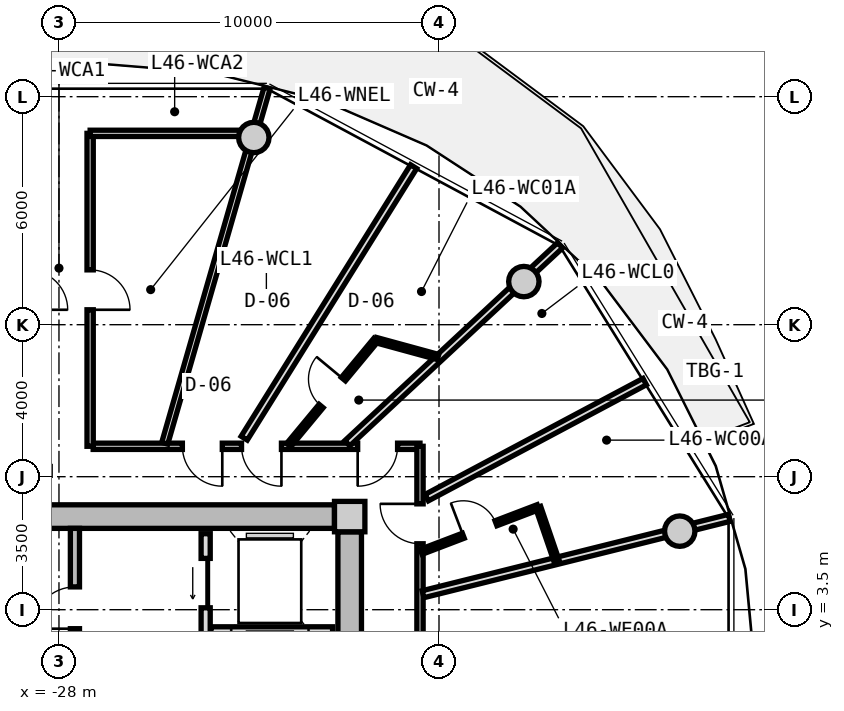
"""IFC4 building model, lengths in metres.
Left out: names, types, materials, properties, quantities, classifications, styles, units other than length and angle.
Written with IfcOpenShell. Run it as: python <this file> out.ifc"""

import sys

from ifc_helpers import new_model, si_unit, direction, frame, frame_2d, origin, origin_2d, place, context, subcontext, project, spatial, rectangle, circle, extrude, source, transform, mapped, element, fill, save


model = new_model("IFC4")
c1 = context("Model", 3, precision=1e-05, world=origin(), true_north=direction((0.0, 1.0)))
c2 = subcontext(c1, "Body", "Model", "MODEL_VIEW")
j1 = project(units=[si_unit("LENGTHUNIT", "METRE"), si_unit("PLANEANGLEUNIT", "RADIAN")], contexts=[c1])
p1 = place(None, origin())
s1 = spatial("IfcSite", under=j1, at=p1, CompositionType="ELEMENT")
p2 = place(p1, origin())
s2 = spatial("IfcBuilding", under=s1, at=p2, CompositionType="ELEMENT")
p3 = place(p2, frame((0.0, 0.0, 149.55)))
s3 = spatial("IfcBuildingStorey", under=s2, at=p3, CompositionType="ELEMENT", Elevation=149.55)
m1 = source(origin(), c2, "Body", "SweptSolid", [
    extrude(rectangle(XDim=0.8, YDim=0.8, at=origin_2d()), origin(), (0.0, 0.0, 1.0), 3.05),
])
p4 = place(p3, frame((-20.35, 5.95, 0.0), z_axis=(0.0, 0.0, 1.0), x_axis=(1.0, 0.0, 0.0)))
e1 = element("IfcColumn", 1, at=p4, inside=s3, PredefinedType="COLUMN", context=c2, shape_type="MappedRepresentation", body=[
    mapped(m1, transform((0.0, 0.0, 0.0), x_axis=(1.0, 0.0, 0.0), y_axis=(0.0, 1.0, 0.0), z_axis=(0.0, 0.0, 1.0), scale=1.0)),
])
m2 = source(origin(), c2, "Body", "SweptSolid", [
    extrude(rectangle(XDim=14.5, YDim=0.62, at=frame_2d((7.25, 0.0))), origin(), (0.0, 0.0, 1.0), 2.81),
])
p5 = place(p3, frame((-35.25, 5.95, 0.0), z_axis=(0.0, 0.0, 1.0), x_axis=(1.0, 0.0, 0.0)))
e2 = element("IfcWall", 2, at=p5, inside=s3, PredefinedType="SHEAR", context=c2, shape_type="MappedRepresentation", body=[
    mapped(m2, transform((0.0, 0.0, 0.0), x_axis=(1.0, 0.0, 0.0), y_axis=(0.0, 1.0, 0.0), z_axis=(0.0, 0.0, 1.0), scale=1.0)),
])
m3 = source(origin(), c2, "Body", "SweptSolid", [
    extrude(rectangle(XDim=11.1, YDim=0.62, at=frame_2d((5.55, 0.0))), origin(), (0.0, 0.0, 1.0), 2.81),
])
p6 = place(p3, frame((-20.35, 5.55, 0.0), z_axis=(0.0, 0.0, 1.0), x_axis=(0.0, -1.0, 0.0)))
e3 = element("IfcWall", 3, at=p6, inside=s3, PredefinedType="SHEAR", context=c2, shape_type="MappedRepresentation", body=[
    mapped(m3, transform((0.0, 0.0, 0.0), x_axis=(1.0, 0.0, 0.0), y_axis=(0.0, 1.0, 0.0), z_axis=(0.0, 0.0, 1.0), scale=1.0)),
])
p7 = place(p6, frame((5.65, 0.0, 0.0)))
e4 = element("IfcOpeningElement", 4, at=p7, cuts=e3, PredefinedType="OPENING", context=c2, shape_type="SweptSolid", body=[
    extrude(rectangle(XDim=1.2, YDim=2.15, at=frame_2d((0.6, 1.075))), frame((0.0, 0.32, 0.0), z_axis=(0.0, -1.0, 0.0), x_axis=(1.0, 0.0, 0.0)), (0.0, 0.0, 1.0), 0.64),
])
p8 = place(p6, frame((9.3, 0.0, 0.0)))
e5 = element("IfcOpeningElement", 5, at=p8, cuts=e3, PredefinedType="OPENING", context=c2, shape_type="SweptSolid", body=[
    extrude(rectangle(XDim=1.0, YDim=2.1, at=frame_2d((0.5, 1.05))), frame((0.0, 0.32, 0.0), z_axis=(0.0, -1.0, 0.0), x_axis=(1.0, 0.0, 0.0)), (0.0, 0.0, 1.0), 0.64),
])
m4 = source(origin(), c2, "Body", "SweptSolid", [
    extrude(circle(Radius=0.4, at=origin_2d()), origin(), (0.0, 0.0, 1.0), 3.05),
])
for number, where, z_axis, x_axis in (
    (6, (-11.665, 5.567, 0.0), (0.0, 0.0, 1.0), (1.0, 0.0, 0.0)),
    (7, (-15.767, 12.135, 0.0), (0.0, 0.0, 1.0), (1.0, 0.0, 0.0)),
    (8, (-22.873, 15.926, 0.0), (0.0, 0.0, 1.0), (1.0, 0.0, 0.0)),
):
    element("IfcColumn", number, at=place(p3, frame(where, z_axis=z_axis, x_axis=x_axis)), inside=s3, PredefinedType="COLUMN", context=c2, shape_type="MappedRepresentation", body=[
        mapped(m4, transform((0.0, 0.0, 0.0), x_axis=(1.0, 0.0, 0.0), y_axis=(0.0, 1.0, 0.0), z_axis=(0.0, 0.0, 1.0), scale=1.0)),
    ])
m5 = source(origin(), c2, "Body", "SweptSolid", [
    extrude(rectangle(XDim=3.19, YDim=0.24, at=frame_2d((1.595, 0.0))), origin(), (0.0, 0.0, 1.0), 2.81),
])
p9 = place(p3, frame((-27.58, 2.45, 0.0), z_axis=(0.0, 0.0, 1.0), x_axis=(0.0, 1.0, 0.0)))
e9 = element("IfcWall", 9, at=p9, inside=s3, PredefinedType="PARTITIONING", context=c2, shape_type="MappedRepresentation", body=[
    mapped(m5, transform((0.0, 0.0, 0.0), x_axis=(1.0, 0.0, 0.0), y_axis=(0.0, 1.0, 0.0), z_axis=(0.0, 0.0, 1.0), scale=1.0)),
])
p10 = place(p9, frame((0.55, 0.0, 0.0)))
e10 = element("IfcOpeningElement", 10, at=p10, cuts=e9, PredefinedType="OPENING", context=c2, shape_type="SweptSolid", body=[
    extrude(rectangle(XDim=1.1, YDim=2.15, at=frame_2d((0.55, 1.075))), frame((0.0, 0.13, 0.0), z_axis=(0.0, -1.0, 0.0), x_axis=(1.0, 0.0, 0.0)), (0.0, 0.0, 1.0), 0.26),
])
m6 = source(origin(), c2, "Body", "SweptSolid", [
    extrude(rectangle(XDim=5.0, YDim=0.24, at=frame_2d((2.5, 0.0))), origin(), (0.0, 0.0, 1.0), 2.795),
])
p11 = place(p3, frame((-24.14, 0.5, 0.0), z_axis=(0.0, 0.0, 1.0), x_axis=(0.0, 1.0, 0.0)))
e11 = element("IfcWall", 11, at=p11, inside=s3, PredefinedType="PARTITIONING", context=c2, shape_type="MappedRepresentation", body=[
    mapped(m6, transform((0.0, 0.0, 0.0), x_axis=(1.0, 0.0, 0.0), y_axis=(0.0, 1.0, 0.0), z_axis=(0.0, 0.0, 1.0), scale=1.0)),
])
p12 = place(p11, frame((3.05, 0.0, 0.0)))
e12 = element("IfcOpeningElement", 12, at=p12, cuts=e11, PredefinedType="OPENING", context=c2, shape_type="SweptSolid", body=[
    extrude(rectangle(XDim=1.3, YDim=2.2, at=frame_2d((0.65, 1.1))), frame((0.0, 0.13, 0.0), z_axis=(0.0, -1.0, 0.0), x_axis=(1.0, 0.0, 0.0)), (0.0, 0.0, 1.0), 0.26),
])
p13 = place(p11, frame((0.55, 0.0, 0.0)))
e13 = element("IfcOpeningElement", 13, at=p13, cuts=e11, PredefinedType="OPENING", context=c2, shape_type="SweptSolid", body=[
    extrude(rectangle(XDim=1.3, YDim=2.2, at=frame_2d((0.65, 1.1))), frame((0.0, 0.13, 0.0), z_axis=(0.0, -1.0, 0.0), x_axis=(1.0, 0.0, 0.0)), (0.0, 0.0, 1.0), 0.26),
])
m7 = source(origin(), c2, "Body", "SweptSolid", [
    extrude(rectangle(XDim=3.2, YDim=0.2, at=frame_2d((1.6, 0.0))), origin(), (0.0, 0.0, 1.0), 2.795),
])
p14 = place(p3, frame((-24.0, 2.95, 0.0), z_axis=(0.0, 0.0, 1.0), x_axis=(1.0, 0.0, 0.0)))
e14 = element("IfcWall", 14, at=p14, inside=s3, PredefinedType="PARTITIONING", context=c2, shape_type="MappedRepresentation", body=[
    mapped(m7, transform((0.0, 0.0, 0.0), x_axis=(1.0, 0.0, 0.0), y_axis=(0.0, 1.0, 0.0), z_axis=(0.0, 0.0, 1.0), scale=1.0)),
])
m8 = source(origin(), c2, "Body", "SweptSolid", [
    extrude(rectangle(XDim=8.6, YDim=0.165, at=frame_2d((4.3, 0.0))), origin(), (0.0, 0.0, 1.0), 2.795),
])
p15 = place(p3, frame((-27.1, 7.8, 0.0), z_axis=(0.0, 0.0, 1.0), x_axis=(1.0, 0.0, 0.0)))
e15 = element("IfcWall", 15, at=p15, inside=s3, PredefinedType="PARTITIONING", context=c2, shape_type="MappedRepresentation", body=[
    mapped(m8, transform((0.0, 0.0, 0.0), x_axis=(1.0, 0.0, 0.0), y_axis=(0.0, 1.0, 0.0), z_axis=(0.0, 0.0, 1.0), scale=1.0)),
])
p16 = place(p15, frame((6.96, 0.0, 0.0)))
e16 = element("IfcOpeningElement", 16, at=p16, cuts=e15, PredefinedType="OPENING", context=c2, shape_type="SweptSolid", body=[
    extrude(rectangle(XDim=1.05, YDim=2.15, at=frame_2d((0.525, 1.075))), frame((0.0, 0.093, 0.0), z_axis=(0.0, -1.0, 0.0), x_axis=(1.0, 0.0, 0.0)), (0.0, 0.0, 1.0), 0.185),
])
p17 = place(p15, frame((3.904, 0.0, 0.0)))
e17 = element("IfcOpeningElement", 17, at=p17, cuts=e15, PredefinedType="OPENING", context=c2, shape_type="SweptSolid", body=[
    extrude(rectangle(XDim=1.05, YDim=2.15, at=frame_2d((0.525, 1.075))), frame((0.0, 0.093, 0.0), z_axis=(0.0, -1.0, 0.0), x_axis=(1.0, 0.0, 0.0)), (0.0, 0.0, 1.0), 0.185),
])
p18 = place(p15, frame((2.347, 0.0, 0.0)))
e18 = element("IfcOpeningElement", 18, at=p18, cuts=e15, PredefinedType="OPENING", context=c2, shape_type="SweptSolid", body=[
    extrude(rectangle(XDim=1.05, YDim=2.15, at=frame_2d((0.525, 1.075))), frame((0.0, 0.093, 0.0), z_axis=(0.0, -1.0, 0.0), x_axis=(1.0, 0.0, 0.0)), (0.0, 0.0, 1.0), 0.185),
])
m9 = source(origin(), c2, "Body", "SweptSolid", [
    extrude(rectangle(XDim=15.6, YDim=0.165, at=frame_2d((7.8, 0.0))), origin(), (0.0, 0.0, 1.0), 2.795),
])
p19 = place(p3, frame((-18.5, 7.8, 0.0), z_axis=(0.0, 0.0, 1.0), x_axis=(0.0, -1.0, 0.0)))
e19 = element("IfcWall", 19, at=p19, inside=s3, PredefinedType="PARTITIONING", context=c2, shape_type="MappedRepresentation", body=[
    mapped(m9, transform((0.0, 0.0, 0.0), x_axis=(1.0, 0.0, 0.0), y_axis=(0.0, 1.0, 0.0), z_axis=(0.0, 0.0, 1.0), scale=1.0)),
])
p20 = place(p19, frame((8.314, 0.0, 0.0)))
e20 = element("IfcOpeningElement", 20, at=p20, cuts=e19, PredefinedType="OPENING", context=c2, shape_type="SweptSolid", body=[
    extrude(rectangle(XDim=1.25, YDim=2.2, at=frame_2d((0.625, 1.1))), frame((0.0, 0.093, 0.0), z_axis=(0.0, -1.0, 0.0), x_axis=(1.0, 0.0, 0.0)), (0.0, 0.0, 1.0), 0.185),
])
p21 = place(p19, frame((1.515, 0.0, 0.0)))
e21 = element("IfcOpeningElement", 21, at=p21, cuts=e19, PredefinedType="OPENING", context=c2, shape_type="SweptSolid", body=[
    extrude(rectangle(XDim=1.05, YDim=2.15, at=frame_2d((0.525, 1.075))), frame((0.0, 0.093, 0.0), z_axis=(0.0, -1.0, 0.0), x_axis=(1.0, 0.0, 0.0)), (0.0, 0.0, 1.0), 0.185),
])
m10 = source(origin(), c2, "Body", "SweptSolid", [
    extrude(rectangle(XDim=9.73, YDim=0.165, at=frame_2d((4.865, 0.0))), origin(), (0.0, 0.0, 1.0), 2.345),
])
p22 = place(p3, frame((-25.217, 7.88, 0.0), z_axis=(0.0, 0.0, 1.0), x_axis=(0.27679492614, 0.960929013436, 0.0)))
e22 = element("IfcWall", 22, at=p22, inside=s3, PredefinedType="PARTITIONING", context=c2, shape_type="MappedRepresentation", body=[
    mapped(m10, transform((0.0, 0.0, 0.0), x_axis=(1.0, 0.0, 0.0), y_axis=(0.0, 1.0, 0.0), z_axis=(0.0, 0.0, 1.0), scale=1.0)),
])
m11 = source(origin(), c2, "Body", "SweptSolid", [
    extrude(rectangle(XDim=8.235, YDim=0.165, at=frame_2d((4.118, 0.0))), origin(), (0.0, 0.0, 1.0), 2.795),
])
p23 = place(p3, frame((-27.18, 7.8, 0.0), z_axis=(0.0, 0.0, 1.0), x_axis=(0.0, 1.0, 0.0)))
e23 = element("IfcWall", 23, at=p23, inside=s3, PredefinedType="PARTITIONING", context=c2, shape_type="MappedRepresentation", body=[
    mapped(m11, transform((0.0, 0.0, 0.0), x_axis=(1.0, 0.0, 0.0), y_axis=(0.0, 1.0, 0.0), z_axis=(0.0, 0.0, 1.0), scale=1.0)),
])
p24 = place(p23, frame((3.593, 0.0, 0.0)))
e24 = element("IfcOpeningElement", 24, at=p24, cuts=e23, PredefinedType="OPENING", context=c2, shape_type="SweptSolid", body=[
    extrude(rectangle(XDim=1.05, YDim=2.15, at=frame_2d((0.525, 1.075))), frame((0.0, 0.093, 0.0), z_axis=(0.0, -1.0, 0.0), x_axis=(1.0, 0.0, 0.0)), (0.0, 0.0, 1.0), 0.185),
])
m12 = source(origin(), c2, "Body", "SweptSolid", [
    extrude(rectangle(XDim=4.469, YDim=0.165, at=frame_2d((2.234, 0.0))), origin(), (0.0, 0.0, 1.0), 2.345),
])
p25 = place(p3, frame((-27.18, 16.035, 0.0), z_axis=(0.0, 0.0, 1.0), x_axis=(1.0, 0.0, 0.0)))
e25 = element("IfcWall", 25, at=p25, inside=s3, PredefinedType="PARTITIONING", context=c2, shape_type="MappedRepresentation", body=[
    mapped(m12, transform((0.0, 0.0, 0.0), x_axis=(1.0, 0.0, 0.0), y_axis=(0.0, 1.0, 0.0), z_axis=(0.0, 0.0, 1.0), scale=1.0)),
])
m13 = source(origin(), c2, "Body", "SweptSolid", [
    extrude(rectangle(XDim=8.305, YDim=0.19, at=frame_2d((4.153, 0.0))), origin(), (0.0, 0.0, 1.0), 2.345),
])
p26 = place(p3, frame((-18.42, 3.908, 0.0), z_axis=(0.0, 0.0, 1.0), x_axis=(0.970309994378, 0.241864662175, 0.0)))
e26 = element("IfcWall", 26, at=p26, inside=s3, PredefinedType="PARTITIONING", context=c2, shape_type="MappedRepresentation", body=[
    mapped(m13, transform((0.0, 0.0, 0.0), x_axis=(1.0, 0.0, 0.0), y_axis=(0.0, 1.0, 0.0), z_axis=(0.0, 0.0, 1.0), scale=1.0)),
])
m14 = source(origin(), c2, "Body", "SweptSolid", [
    extrude(rectangle(XDim=7.648, YDim=0.19, at=frame_2d((3.824, 0.0))), origin(), (0.0, 0.0, 1.0), 2.345),
])
p27 = place(p3, frame((-20.413, 7.88, 0.0), z_axis=(0.0, 0.0, 1.0), x_axis=(0.732182665826, 0.681108320213, 0.0)))
e27 = element("IfcWall", 27, at=p27, inside=s3, PredefinedType="PARTITIONING", context=c2, shape_type="MappedRepresentation", body=[
    mapped(m14, transform((0.0, 0.0, 0.0), x_axis=(1.0, 0.0, 0.0), y_axis=(0.0, 1.0, 0.0), z_axis=(0.0, 0.0, 1.0), scale=1.0)),
])
m15 = source(origin(), c2, "Body", "SweptSolid", [
    extrude(rectangle(XDim=6.499, YDim=0.19, at=frame_2d((3.25, 0.0))), origin(), (0.0, 0.0, 1.0), 2.795),
])
p28 = place(p3, frame((-18.324, 6.449, 0.0), z_axis=(0.0, 0.0, 1.0), x_axis=(0.882715595921, 0.469907625729, 0.0)))
e28 = element("IfcWall", 28, at=p28, inside=s3, PredefinedType="PARTITIONING", context=c2, shape_type="MappedRepresentation", body=[
    mapped(m15, transform((0.0, 0.0, 0.0), x_axis=(1.0, 0.0, 0.0), y_axis=(0.0, 1.0, 0.0), z_axis=(0.0, 0.0, 1.0), scale=1.0)),
])
m16 = source(origin(), c2, "Body", "SweptSolid", [
    extrude(rectangle(XDim=3.295, YDim=0.14, at=frame_2d((1.647, 0.0))), origin(), (0.0, 0.0, 1.0), 2.795),
])
p29 = place(p3, frame((-18.47, 5.023, 0.0), z_axis=(0.0, 0.0, 1.0), x_axis=(0.934202224769, 0.356743890258, 0.0)))
e29 = element("IfcWall", 29, at=p29, inside=s3, PredefinedType="PARTITIONING", context=c2, shape_type="MappedRepresentation", body=[
    mapped(m16, transform((0.0, 0.0, 0.0), x_axis=(1.0, 0.0, 0.0), y_axis=(0.0, 1.0, 0.0), z_axis=(0.0, 0.0, 1.0), scale=1.0)),
])
p30 = place(p29, frame((1.188, 0.0, 0.0)))
e30 = element("IfcOpeningElement", 30, at=p30, cuts=e29, PredefinedType="OPENING", context=c2, shape_type="SweptSolid", body=[
    extrude(rectangle(XDim=0.92, YDim=2.1, at=frame_2d((0.46, 1.05))), frame((0.0, 0.08, 0.0), z_axis=(0.0, -1.0, 0.0), x_axis=(1.0, 0.0, 0.0)), (0.0, 0.0, 1.0), 0.16),
])
m17 = source(origin(), c2, "Body", "SweptSolid", [
    extrude(rectangle(XDim=1.479, YDim=0.14, at=frame_2d((0.739, 0.0))), origin(), (0.0, 0.0, 1.0), 2.795),
])
p31 = place(p3, frame((-15.392, 6.198, 0.0), z_axis=(0.0, 0.0, 1.0), x_axis=(0.324438293903, -0.945906862989, 0.0)))
e31 = element("IfcWall", 31, at=p31, inside=s3, PredefinedType="PARTITIONING", context=c2, shape_type="MappedRepresentation", body=[
    mapped(m17, transform((0.0, 0.0, 0.0), x_axis=(1.0, 0.0, 0.0), y_axis=(0.0, 1.0, 0.0), z_axis=(0.0, 0.0, 1.0), scale=1.0)),
])
m18 = source(origin(), c2, "Body", "SweptSolid", [
    extrude(rectangle(XDim=8.422, YDim=0.19, at=frame_2d((4.211, 0.0))), origin(), (0.0, 0.0, 1.0), 2.795),
])
p32 = place(p3, frame((-23.125, 8.014, 0.0), z_axis=(0.0, 0.0, 1.0), x_axis=(0.52925352896, 0.848463730565, 0.0)))
e32 = element("IfcWall", 32, at=p32, inside=s3, PredefinedType="PARTITIONING", context=c2, shape_type="MappedRepresentation", body=[
    mapped(m18, transform((0.0, 0.0, 0.0), x_axis=(1.0, 0.0, 0.0), y_axis=(0.0, 1.0, 0.0), z_axis=(0.0, 0.0, 1.0), scale=1.0)),
])
m19 = source(origin(), c2, "Body", "SweptSolid", [
    extrude(rectangle(XDim=3.593, YDim=0.14, at=frame_2d((1.797, 0.0))), origin(), (0.0, 0.0, 1.0), 2.795),
])
p33 = place(p3, frame((-21.955, 7.83, 0.0), z_axis=(0.0, 0.0, 1.0), x_axis=(0.638271060163, 0.769811700196, 0.0)))
e33 = element("IfcWall", 33, at=p33, inside=s3, PredefinedType="PARTITIONING", context=c2, shape_type="MappedRepresentation", body=[
    mapped(m19, transform((0.0, 0.0, 0.0), x_axis=(1.0, 0.0, 0.0), y_axis=(0.0, 1.0, 0.0), z_axis=(0.0, 0.0, 1.0), scale=1.0)),
])
p34 = place(p33, frame((1.337, 0.0, 0.0)))
e34 = element("IfcOpeningElement", 34, at=p34, cuts=e33, PredefinedType="OPENING", context=c2, shape_type="SweptSolid", body=[
    extrude(rectangle(XDim=0.92, YDim=2.1, at=frame_2d((0.46, 1.05))), frame((0.0, 0.08, 0.0), z_axis=(0.0, -1.0, 0.0), x_axis=(1.0, 0.0, 0.0)), (0.0, 0.0, 1.0), 0.16),
])
m20 = source(origin(), c2, "Body", "SweptSolid", [
    extrude(rectangle(XDim=1.697, YDim=0.14, at=frame_2d((0.848, 0.0))), origin(), (0.0, 0.0, 1.0), 2.795),
])
p35 = place(p3, frame((-19.662, 10.596, 0.0), z_axis=(0.0, 0.0, 1.0), x_axis=(0.964667458123, -0.263470482671, 0.0)))
e35 = element("IfcWall", 35, at=p35, inside=s3, PredefinedType="PARTITIONING", context=c2, shape_type="MappedRepresentation", body=[
    mapped(m20, transform((0.0, 0.0, 0.0), x_axis=(1.0, 0.0, 0.0), y_axis=(0.0, 1.0, 0.0), z_axis=(0.0, 0.0, 1.0), scale=1.0)),
])
m21 = source(origin(), c2, "Body", "SweptSolid", [
    extrude(rectangle(XDim=1.1, YDim=2.15, at=frame_2d((0.55, 1.075))), frame((0.0, 0.025, 0.0), z_axis=(0.0, -1.0, 0.0), x_axis=(1.0, 0.0, 0.0)), (0.0, 0.0, 1.0), 0.05),
])
p36 = place(p10, origin())
e36 = element("IfcDoor", 36, at=p36, inside=s3, OperationType="SINGLE_SWING_LEFT", PredefinedType="DOOR", context=c2, shape_type="MappedRepresentation", body=[
    mapped(m21, transform((0.0, 0.0, 0.0), x_axis=(1.0, 0.0, 0.0), y_axis=(0.0, 1.0, 0.0), z_axis=(0.0, 0.0, 1.0), scale=1.0)),
])
fill(e10, e36)
m22 = source(origin(), c2, "Body", "SweptSolid", [
    extrude(rectangle(XDim=1.3, YDim=2.2, at=frame_2d((0.65, 1.1))), frame((0.0, 0.025, 0.0), z_axis=(0.0, -1.0, 0.0), x_axis=(1.0, 0.0, 0.0)), (0.0, 0.0, 1.0), 0.05),
])
p37 = place(p12, origin())
e37 = element("IfcDoor", 37, at=p37, inside=s3, OperationType="SLIDING_TO_LEFT", PredefinedType="DOOR", context=c2, shape_type="MappedRepresentation", body=[
    mapped(m22, transform((0.0, 0.0, 0.0), x_axis=(1.0, 0.0, 0.0), y_axis=(0.0, 1.0, 0.0), z_axis=(0.0, 0.0, 1.0), scale=1.0)),
])
fill(e12, e37)
m23 = source(origin(), c2, "Body", "SweptSolid", [
    extrude(rectangle(XDim=1.05, YDim=2.15, at=frame_2d((0.525, 1.075))), frame((0.0, 0.025, 0.0), z_axis=(0.0, -1.0, 0.0), x_axis=(1.0, 0.0, 0.0)), (0.0, 0.0, 1.0), 0.05),
])
p38 = place(p24, frame((1.05, 0.0, 0.0), z_axis=(0.0, 0.0, 1.0), x_axis=(-1.0, 0.0, 0.0)))
e38 = element("IfcDoor", 38, at=p38, inside=s3, OperationType="SINGLE_SWING_RIGHT", PredefinedType="DOOR", context=c2, shape_type="MappedRepresentation", body=[
    mapped(m23, transform((0.0, 0.0, 0.0), x_axis=(1.0, 0.0, 0.0), y_axis=(0.0, 1.0, 0.0), z_axis=(0.0, 0.0, 1.0), scale=1.0)),
])
fill(e24, e38)
p39 = place(p21, frame((1.05, 0.0, 0.0), z_axis=(0.0, 0.0, 1.0), x_axis=(-1.0, 0.0, 0.0)))
e39 = element("IfcDoor", 39, at=p39, inside=s3, OperationType="SINGLE_SWING_RIGHT", PredefinedType="DOOR", context=c2, shape_type="MappedRepresentation", body=[
    mapped(m23, transform((0.0, 0.0, 0.0), x_axis=(1.0, 0.0, 0.0), y_axis=(0.0, 1.0, 0.0), z_axis=(0.0, 0.0, 1.0), scale=1.0)),
])
fill(e21, e39)
m24 = source(origin(), c2, "Body", "SweptSolid", [
    extrude(rectangle(XDim=0.92, YDim=2.1, at=frame_2d((0.46, 1.05))), frame((0.0, 0.025, 0.0), z_axis=(0.0, -1.0, 0.0), x_axis=(1.0, 0.0, 0.0)), (0.0, 0.0, 1.0), 0.05),
])
p40 = place(p30, origin())
e40 = element("IfcDoor", 40, at=p40, inside=s3, OperationType="SINGLE_SWING_LEFT", PredefinedType="DOOR", context=c2, shape_type="MappedRepresentation", body=[
    mapped(m24, transform((0.0, 0.0, 0.0), x_axis=(1.0, 0.0, 0.0), y_axis=(0.0, 1.0, 0.0), z_axis=(0.0, 0.0, 1.0), scale=1.0)),
])
fill(e30, e40)
p41 = place(p16, frame((1.05, 0.0, 0.0), z_axis=(0.0, 0.0, 1.0), x_axis=(-1.0, 0.0, 0.0)))
e41 = element("IfcDoor", 41, at=p41, inside=s3, OperationType="SINGLE_SWING_RIGHT", PredefinedType="DOOR", context=c2, shape_type="MappedRepresentation", body=[
    mapped(m23, transform((0.0, 0.0, 0.0), x_axis=(1.0, 0.0, 0.0), y_axis=(0.0, 1.0, 0.0), z_axis=(0.0, 0.0, 1.0), scale=1.0)),
])
fill(e16, e41)
p42 = place(p17, frame((1.05, 0.0, 0.0), z_axis=(0.0, 0.0, 1.0), x_axis=(-1.0, 0.0, 0.0)))
e42 = element("IfcDoor", 42, at=p42, inside=s3, OperationType="SINGLE_SWING_LEFT", PredefinedType="DOOR", context=c2, shape_type="MappedRepresentation", body=[
    mapped(m23, transform((0.0, 0.0, 0.0), x_axis=(1.0, 0.0, 0.0), y_axis=(0.0, 1.0, 0.0), z_axis=(0.0, 0.0, 1.0), scale=1.0)),
])
fill(e17, e42)
p43 = place(p34, origin())
e43 = element("IfcDoor", 43, at=p43, inside=s3, OperationType="SINGLE_SWING_RIGHT", PredefinedType="DOOR", context=c2, shape_type="MappedRepresentation", body=[
    mapped(m24, transform((0.0, 0.0, 0.0), x_axis=(1.0, 0.0, 0.0), y_axis=(0.0, 1.0, 0.0), z_axis=(0.0, 0.0, 1.0), scale=1.0)),
])
fill(e34, e43)
p44 = place(p18, frame((1.05, 0.0, 0.0), z_axis=(0.0, 0.0, 1.0), x_axis=(-1.0, 0.0, 0.0)))
e44 = element("IfcDoor", 44, at=p44, inside=s3, OperationType="SINGLE_SWING_LEFT", PredefinedType="DOOR", context=c2, shape_type="MappedRepresentation", body=[
    mapped(m23, transform((0.0, 0.0, 0.0), x_axis=(1.0, 0.0, 0.0), y_axis=(0.0, 1.0, 0.0), z_axis=(0.0, 0.0, 1.0), scale=1.0)),
])
fill(e18, e44)
save(model, sys.argv[1])
